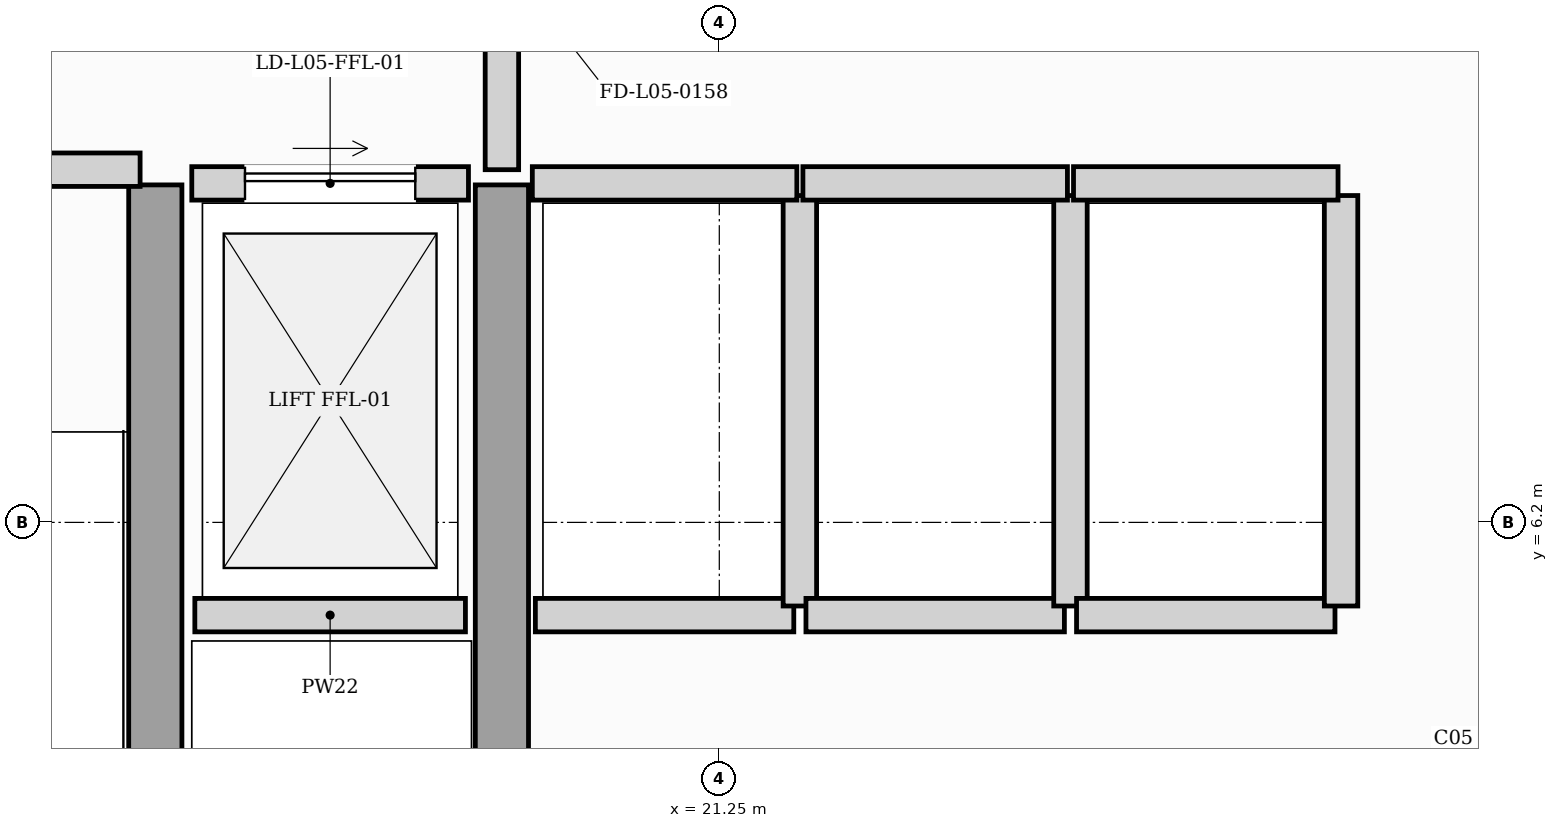
"""IFC4 building model, lengths in metres.
Left out: names, types, materials, properties, quantities, classifications, styles, units other than length and angle.
Written with IfcOpenShell. Run it as: python <this file> out.ifc"""

import sys

from ifc_helpers import new_model, si_unit, direction, frame, frame_2d, origin, place, context, subcontext, project, spatial, rectangle, extrude, element, fill, save


model = new_model("IFC4")
c1 = context("Model", 3, precision=1e-05, world=origin(), true_north=direction((0.0, 1.0)))
c2 = subcontext(c1, "Body", "Model", "MODEL_VIEW")
j1 = project(units=[si_unit("LENGTHUNIT", "METRE"), si_unit("PLANEANGLEUNIT", "RADIAN")], contexts=[c1])
p1 = place(None, origin())
s1 = spatial("IfcSite", under=j1, at=p1, CompositionType="ELEMENT")
p2 = place(p1, origin())
s2 = spatial("IfcBuilding", under=s1, at=p2, CompositionType="ELEMENT")
p3 = place(p2, frame((0.0, 0.0, 24.6)))
s3 = spatial("IfcBuildingStorey", under=s2, at=p3, CompositionType="ELEMENT", Elevation=24.6)
for number, where, z_axis, x_axis in (
    (1, (17.54, 0.92, 0.0), (0.0, 0.0, 1.0), (0.0, 1.0, 0.0)),
    (2, (19.82, 0.92, 0.0), (0.0, 0.0, 1.0), (0.0, 1.0, 0.0)),
):
    element("IfcWall", number, at=place(p3, frame(where, z_axis=z_axis, x_axis=x_axis)), inside=s3, PredefinedType="SHEAR", context=c2, shape_type="SweptSolid", body=[
        extrude(rectangle(XDim=7.5, YDim=0.35, at=frame_2d((3.75, 0.0))), origin(), (0.0, 0.0, 1.0), 4.95),
    ])
p4 = place(p3, frame((17.8, 5.59, 0.0), z_axis=(0.0, 0.0, 1.0), x_axis=(1.0, 0.0, 0.0)))
e3 = element("IfcWall", 3, at=p4, inside=s3, PredefinedType="SOLIDWALL", context=c2, shape_type="SweptSolid", body=[
    extrude(rectangle(XDim=1.78, YDim=0.22, at=frame_2d((0.89, 0.0))), origin(), (0.0, 0.0, 1.0), 4.95),
])
p5 = place(p3, frame((17.78, 8.43, 0.0), z_axis=(0.0, 0.0, 1.0), x_axis=(1.0, 0.0, 0.0)))
e4 = element("IfcWall", 4, at=p5, inside=s3, PredefinedType="SOLIDWALL", context=c2, shape_type="SweptSolid", body=[
    extrude(rectangle(XDim=1.82, YDim=0.22, at=frame_2d((0.91, 0.0))), origin(), (0.0, 0.0, 1.0), 4.95),
])
p6 = place(p5, frame((0.35, 0.0, 0.0)))
e5 = element("IfcOpeningElement", 5, at=p6, cuts=e4, PredefinedType="OPENING", context=c2, shape_type="SweptSolid", body=[
    extrude(rectangle(XDim=1.12, YDim=2.25, at=frame_2d((0.56, 1.125))), frame((0.0, 0.12, 0.0), z_axis=(0.0, -1.0, 0.0), x_axis=(1.0, 0.0, 0.0)), (0.0, 0.0, 1.0), 0.24),
])
p7 = place(p3, frame((20.04, 5.59, 0.0), z_axis=(0.0, 0.0, 1.0), x_axis=(1.0, 0.0, 0.0)))
e6 = element("IfcWall", 6, at=p7, inside=s3, PredefinedType="SOLIDWALL", context=c2, shape_type="SweptSolid", body=[
    extrude(rectangle(XDim=1.7, YDim=0.22, at=frame_2d((0.85, 0.0))), origin(), (0.0, 0.0, 1.0), 4.95),
])
p8 = place(p3, frame((21.78, 5.65, 0.0), z_axis=(0.0, 0.0, 1.0), x_axis=(0.0, 1.0, 0.0)))
e7 = element("IfcWall", 7, at=p8, inside=s3, PredefinedType="SOLIDWALL", context=c2, shape_type="SweptSolid", body=[
    extrude(rectangle(XDim=2.7, YDim=0.22, at=frame_2d((1.35, 0.0))), origin(), (0.0, 0.0, 1.0), 4.95),
])
p9 = place(p3, frame((20.02, 8.43, 0.0), z_axis=(0.0, 0.0, 1.0), x_axis=(1.0, 0.0, 0.0)))
e8 = element("IfcWall", 8, at=p9, inside=s3, PredefinedType="SOLIDWALL", context=c2, shape_type="SweptSolid", body=[
    extrude(rectangle(XDim=1.74, YDim=0.22, at=frame_2d((0.87, 0.0))), origin(), (0.0, 0.0, 1.0), 4.95),
])
p10 = place(p3, frame((21.82, 5.59, 0.0), z_axis=(0.0, 0.0, 1.0), x_axis=(1.0, 0.0, 0.0)))
e9 = element("IfcWall", 9, at=p10, inside=s3, PredefinedType="SOLIDWALL", context=c2, shape_type="SweptSolid", body=[
    extrude(rectangle(XDim=1.7, YDim=0.22, at=frame_2d((0.85, 0.0))), origin(), (0.0, 0.0, 1.0), 4.95),
])
p11 = place(p3, frame((23.56, 5.65, 0.0), z_axis=(0.0, 0.0, 1.0), x_axis=(0.0, 1.0, 0.0)))
e10 = element("IfcWall", 10, at=p11, inside=s3, PredefinedType="SOLIDWALL", context=c2, shape_type="SweptSolid", body=[
    extrude(rectangle(XDim=2.7, YDim=0.22, at=frame_2d((1.35, 0.0))), origin(), (0.0, 0.0, 1.0), 4.95),
])
p12 = place(p3, frame((21.8, 8.43, 0.0), z_axis=(0.0, 0.0, 1.0), x_axis=(1.0, 0.0, 0.0)))
e11 = element("IfcWall", 11, at=p12, inside=s3, PredefinedType="SOLIDWALL", context=c2, shape_type="SweptSolid", body=[
    extrude(rectangle(XDim=1.74, YDim=0.22, at=frame_2d((0.87, 0.0))), origin(), (0.0, 0.0, 1.0), 4.95),
])
p13 = place(p3, frame((23.6, 5.59, 0.0), z_axis=(0.0, 0.0, 1.0), x_axis=(1.0, 0.0, 0.0)))
e12 = element("IfcWall", 12, at=p13, inside=s3, PredefinedType="SOLIDWALL", context=c2, shape_type="SweptSolid", body=[
    extrude(rectangle(XDim=1.7, YDim=0.22, at=frame_2d((0.85, 0.0))), origin(), (0.0, 0.0, 1.0), 4.95),
])
p14 = place(p3, frame((25.34, 5.65, 0.0), z_axis=(0.0, 0.0, 1.0), x_axis=(0.0, 1.0, 0.0)))
e13 = element("IfcWall", 13, at=p14, inside=s3, PredefinedType="SOLIDWALL", context=c2, shape_type="SweptSolid", body=[
    extrude(rectangle(XDim=2.7, YDim=0.22, at=frame_2d((1.35, 0.0))), origin(), (0.0, 0.0, 1.0), 4.95),
])
p15 = place(p3, frame((23.58, 8.43, 0.0), z_axis=(0.0, 0.0, 1.0), x_axis=(1.0, 0.0, 0.0)))
e14 = element("IfcWall", 14, at=p15, inside=s3, PredefinedType="SOLIDWALL", context=c2, shape_type="SweptSolid", body=[
    extrude(rectangle(XDim=1.74, YDim=0.22, at=frame_2d((0.87, 0.0))), origin(), (0.0, 0.0, 1.0), 4.95),
])
p16 = place(p3, frame((14.04, 8.52, 0.0), z_axis=(0.0, 0.0, 1.0), x_axis=(1.0, 0.0, 0.0)))
e15 = element("IfcWall", 15, at=p16, inside=s3, PredefinedType="SOLIDWALL", context=c2, shape_type="SweptSolid", body=[
    extrude(rectangle(XDim=3.4, YDim=0.22, at=frame_2d((1.7, 0.0))), origin(), (0.0, 0.0, 1.0), 4.95),
])
p17 = place(p16, frame((1.125, 0.0, 0.0)))
e16 = element("IfcOpeningElement", 16, at=p17, cuts=e15, PredefinedType="OPENING", context=c2, shape_type="SweptSolid", body=[
    extrude(rectangle(XDim=1.15, YDim=2.2, at=frame_2d((0.575, 1.1))), frame((0.0, 0.12, 0.0), z_axis=(0.0, -1.0, 0.0), x_axis=(1.0, 0.0, 0.0)), (0.0, 0.0, 1.0), 0.24),
])
p18 = place(p3, frame((19.82, 8.52, 0.0), z_axis=(0.0, 0.0, 1.0), x_axis=(0.0, 1.0, 0.0)))
e17 = element("IfcWall", 17, at=p18, inside=s3, PredefinedType="SOLIDWALL", context=c2, shape_type="SweptSolid", body=[
    extrude(rectangle(XDim=2.8, YDim=0.22, at=frame_2d((1.4, 0.0))), origin(), (0.0, 0.0, 1.0), 4.406),
])
p19 = place(p18, frame((0.85, 0.0, 0.0)))
e18 = element("IfcOpeningElement", 18, at=p19, cuts=e17, PredefinedType="OPENING", context=c2, shape_type="SweptSolid", body=[
    extrude(rectangle(XDim=1.1, YDim=2.2, at=frame_2d((0.55, 1.1))), frame((0.0, 0.12, 0.0), z_axis=(0.0, -1.0, 0.0), x_axis=(1.0, 0.0, 0.0)), (0.0, 0.0, 1.0), 0.24),
])
p20 = place(p6, origin())
e19 = element("IfcDoor", 19, at=p20, inside=s3, OperationType="SLIDING_TO_RIGHT", PredefinedType="DOOR", context=c2, shape_type="SweptSolid", body=[
    extrude(rectangle(XDim=1.12, YDim=2.25, at=frame_2d((0.56, 1.125))), frame((0.0, 0.025, 0.0), z_axis=(0.0, -1.0, 0.0), x_axis=(1.0, 0.0, 0.0)), (0.0, 0.0, 1.0), 0.05),
])
fill(e5, e19)
save(model, sys.argv[1])
